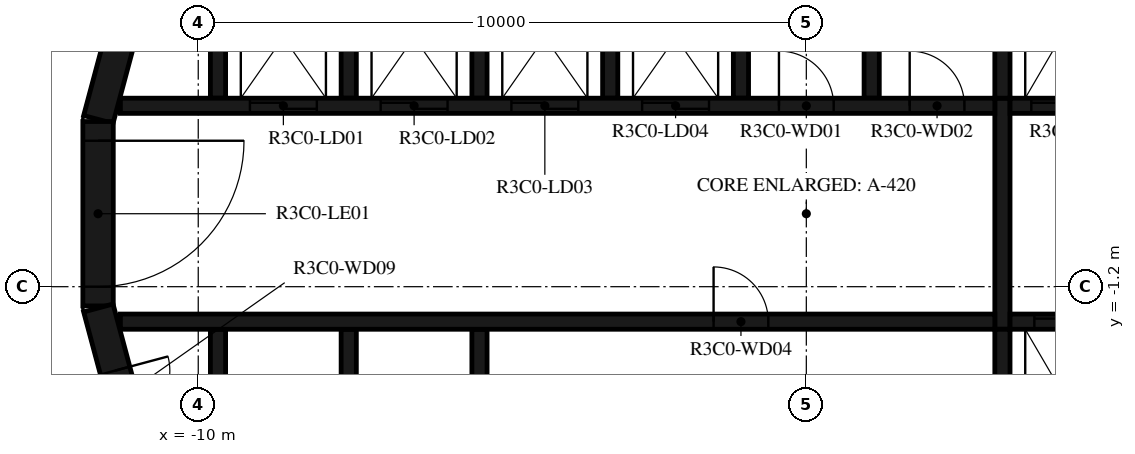
"""IFC4 building model, lengths in metres.
Left out: names, types, materials, properties, quantities, classifications, styles, units other than length and angle.
Written with IfcOpenShell. Run it as: python <this file> out.ifc"""

import sys

from ifc_helpers import new_model, si_unit, direction, frame, frame_2d, origin, place, context, subcontext, project, spatial, polyline, rectangle, outline, extrude, element, fill, save


model = new_model("IFC4")
c1 = context("Model", 3, precision=1e-05, world=origin(), true_north=direction((0.0, 1.0)))
c2 = subcontext(c1, "Body", "Model", "MODEL_VIEW")
j1 = project(units=[si_unit("LENGTHUNIT", "METRE"), si_unit("PLANEANGLEUNIT", "RADIAN")], contexts=[c1])
p1 = place(None, origin())
s1 = spatial("IfcSite", under=j1, at=p1, CompositionType="ELEMENT")
p2 = place(p1, origin())
s2 = spatial("IfcBuilding", under=s1, at=p2, CompositionType="ELEMENT")
p3 = place(p2, frame((0.0, 0.0, 134.4)))
s3 = spatial("IfcBuildingStorey", under=s2, at=p3, CompositionType="ELEMENT", Elevation=134.4)
p4 = place(p3, frame((-10.858, 4.479, 0.0), z_axis=(0.0, 0.0, 1.0), x_axis=(-0.258734743916, -0.965948410781, 0.0)))
e1 = element("IfcWall", 1, at=p4, inside=s3, PredefinedType="SHEAR", context=c2, shape_type="SweptSolid", body=[
    extrude(rectangle(XDim=3.033, YDim=0.5, at=frame_2d((1.516, 0.0))), origin(), (0.0, 0.0, 1.0), 3.12),
])
p5 = place(p3, frame((-11.647, 1.516, 0.0), z_axis=(0.0, 0.0, 1.0), x_axis=(0.0, -1.0, 0.0)))
e2 = element("IfcWall", 2, at=p5, inside=s3, PredefinedType="SHEAR", context=c2, shape_type="SweptSolid", body=[
    extrude(rectangle(XDim=3.033, YDim=0.5, at=frame_2d((1.516, 0.0))), origin(), (0.0, 0.0, 1.0), 3.12),
])
p6 = place(p5, frame((0.316, 0.0, 0.0)))
e3 = element("IfcOpeningElement", 3, at=p6, cuts=e2, PredefinedType="OPENING", context=c2, shape_type="SweptSolid", body=[
    extrude(rectangle(XDim=2.4, YDim=2.1, at=frame_2d((1.2, 1.05))), frame((0.0, 0.26, 0.0), z_axis=(0.0, -1.0, 0.0), x_axis=(1.0, 0.0, 0.0)), (0.0, 0.0, 1.0), 0.52),
])
p7 = place(p3, frame((-11.643, -1.55, 0.0), z_axis=(0.0, 0.0, 1.0), x_axis=(0.258734743916, -0.965948410781, 0.0)))
e4 = element("IfcWall", 4, at=p7, inside=s3, PredefinedType="SHEAR", context=c2, shape_type="SweptSolid", body=[
    extrude(rectangle(XDim=3.033, YDim=0.5, at=frame_2d((1.516, 0.0))), origin(), (0.0, 0.0, 1.0), 3.12),
])
p8 = place(p7, frame((1.066, 0.0, 0.0)))
e5 = element("IfcOpeningElement", 5, at=p8, cuts=e4, PredefinedType="OPENING", context=c2, shape_type="SweptSolid", body=[
    extrude(rectangle(XDim=0.9, YDim=2.1, at=frame_2d((0.45, 1.05))), frame((0.0, 0.26, 0.0), z_axis=(0.0, -1.0, 0.0), x_axis=(1.0, 0.0, 0.0)), (0.0, 0.0, 1.0), 0.52),
])
p9 = place(p3, origin())
e6 = element("IfcWall", 6, at=p9, inside=s3, PredefinedType="SHEAR", context=c2, shape_type="SweptSolid", body=[
    extrude(outline(polyline([(-9.55, 4.8), (-7.65, 4.8), (-7.65, 1.9), (-7.4, 1.9), (-7.4, 4.8), (-5.5, 4.8), (-5.5, 1.9), (-5.25, 1.9), (-5.25, 4.8), (-3.35, 4.8), (-3.35, 1.9), (-3.1, 1.9), (-3.1, 4.8), (-1.2, 4.8), (-1.2, 1.9), (-0.95, 1.9), (-0.95, 4.8), (0.95, 4.8), (0.95, 1.9), (1.2, 1.9), (1.2, 4.8), (3.1, 4.8), (3.1, 1.9), (3.35, 1.9), (3.35, 4.8), (5.25, 4.8), (5.25, 1.9), (5.5, 1.9), (5.5, 4.8), (7.4, 4.8), (7.4, 1.9), (7.65, 1.9), (7.65, 4.8), (9.55, 4.8), (9.55, 1.9), (9.8, 1.9), (9.8, 4.8), (9.8, 5.05), (-9.8, 5.05), (-9.8, 4.8), (-9.8, 1.9), (-9.55, 1.9), (-9.55, 4.8)])), origin(), (0.0, 0.0, 1.0), 3.12),
])
p10 = place(p3, origin())
e7 = element("IfcWall", 7, at=p10, inside=s3, PredefinedType="SHEAR", context=c2, shape_type="SweptSolid", body=[
    extrude(outline(polyline([(9.8, -5.05), (9.8, -4.8), (9.8, -1.9), (9.55, -1.9), (9.55, -4.8), (7.65, -4.8), (7.65, -1.9), (7.4, -1.9), (7.4, -4.8), (5.5, -4.8), (5.5, -1.9), (5.25, -1.9), (5.25, -4.8), (3.35, -4.8), (3.35, -1.9), (3.1, -1.9), (3.1, -4.8), (-5.25, -4.8), (-5.25, -1.9), (-5.5, -1.9), (-5.5, -4.8), (-7.4, -4.8), (-7.4, -1.9), (-7.65, -1.9), (-7.65, -4.8), (-9.55, -4.8), (-9.55, -1.9), (-9.8, -1.9), (-9.8, -4.8), (-9.8, -5.05), (9.8, -5.05)])), origin(), (0.0, 0.0, 1.0), 3.12),
])
p11 = place(p3, frame((-11.28, 1.775, 0.0), z_axis=(0.0, 0.0, 1.0), x_axis=(1.0, 0.0, 0.0)))
e8 = element("IfcWall", 8, at=p11, inside=s3, PredefinedType="SHEAR", context=c2, shape_type="SweptSolid", body=[
    extrude(rectangle(XDim=14.38, YDim=0.25, at=frame_2d((7.19, 0.0))), origin(), (0.0, 0.0, 1.0), 3.12),
])
p12 = place(p11, frame((2.13, 0.0, 0.0)))
e9 = element("IfcOpeningElement", 9, at=p12, cuts=e8, PredefinedType="OPENING", context=c2, shape_type="SweptSolid", body=[
    extrude(rectangle(XDim=1.1, YDim=2.1, at=frame_2d((0.55, 1.05))), frame((0.0, 0.135, 0.0), z_axis=(0.0, -1.0, 0.0), x_axis=(1.0, 0.0, 0.0)), (0.0, 0.0, 1.0), 0.27),
])
p13 = place(p11, frame((4.28, 0.0, 0.0)))
e10 = element("IfcOpeningElement", 10, at=p13, cuts=e8, PredefinedType="OPENING", context=c2, shape_type="SweptSolid", body=[
    extrude(rectangle(XDim=1.1, YDim=2.1, at=frame_2d((0.55, 1.05))), frame((0.0, 0.135, 0.0), z_axis=(0.0, -1.0, 0.0), x_axis=(1.0, 0.0, 0.0)), (0.0, 0.0, 1.0), 0.27),
])
p14 = place(p11, frame((6.43, 0.0, 0.0)))
e11 = element("IfcOpeningElement", 11, at=p14, cuts=e8, PredefinedType="OPENING", context=c2, shape_type="SweptSolid", body=[
    extrude(rectangle(XDim=1.1, YDim=2.1, at=frame_2d((0.55, 1.05))), frame((0.0, 0.135, 0.0), z_axis=(0.0, -1.0, 0.0), x_axis=(1.0, 0.0, 0.0)), (0.0, 0.0, 1.0), 0.27),
])
p15 = place(p11, frame((8.58, 0.0, 0.0)))
e12 = element("IfcOpeningElement", 12, at=p15, cuts=e8, PredefinedType="OPENING", context=c2, shape_type="SweptSolid", body=[
    extrude(rectangle(XDim=1.1, YDim=2.1, at=frame_2d((0.55, 1.05))), frame((0.0, 0.135, 0.0), z_axis=(0.0, -1.0, 0.0), x_axis=(1.0, 0.0, 0.0)), (0.0, 0.0, 1.0), 0.27),
])
p16 = place(p11, frame((10.83, 0.0, 0.0)))
e13 = element("IfcOpeningElement", 13, at=p16, cuts=e8, PredefinedType="OPENING", context=c2, shape_type="SweptSolid", body=[
    extrude(rectangle(XDim=0.9, YDim=2.1, at=frame_2d((0.45, 1.05))), frame((0.0, 0.135, 0.0), z_axis=(0.0, -1.0, 0.0), x_axis=(1.0, 0.0, 0.0)), (0.0, 0.0, 1.0), 0.27),
])
p17 = place(p11, frame((12.98, 0.0, 0.0)))
e14 = element("IfcOpeningElement", 14, at=p17, cuts=e8, PredefinedType="OPENING", context=c2, shape_type="SweptSolid", body=[
    extrude(rectangle(XDim=0.9, YDim=2.1, at=frame_2d((0.45, 1.05))), frame((0.0, 0.135, 0.0), z_axis=(0.0, -1.0, 0.0), x_axis=(1.0, 0.0, 0.0)), (0.0, 0.0, 1.0), 0.27),
])
p18 = place(p3, frame((3.35, 1.775, 0.0), z_axis=(0.0, 0.0, 1.0), x_axis=(1.0, 0.0, 0.0)))
e15 = element("IfcWall", 15, at=p18, inside=s3, PredefinedType="SHEAR", context=c2, shape_type="SweptSolid", body=[
    extrude(rectangle(XDim=7.93, YDim=0.25, at=frame_2d((3.965, 0.0))), origin(), (0.0, 0.0, 1.0), 3.12),
])
p19 = place(p18, frame((0.35, 0.0, 0.0)))
e16 = element("IfcOpeningElement", 16, at=p19, cuts=e15, PredefinedType="OPENING", context=c2, shape_type="SweptSolid", body=[
    extrude(rectangle(XDim=1.2, YDim=2.4, at=frame_2d((0.6, 1.2))), frame((0.0, 0.135, 0.0), z_axis=(0.0, -1.0, 0.0), x_axis=(1.0, 0.0, 0.0)), (0.0, 0.0, 1.0), 0.27),
])
p20 = place(p18, frame((2.5, 0.0, 0.0)))
e17 = element("IfcOpeningElement", 17, at=p20, cuts=e15, PredefinedType="OPENING", context=c2, shape_type="SweptSolid", body=[
    extrude(rectangle(XDim=1.2, YDim=2.4, at=frame_2d((0.6, 1.2))), frame((0.0, 0.135, 0.0), z_axis=(0.0, -1.0, 0.0), x_axis=(1.0, 0.0, 0.0)), (0.0, 0.0, 1.0), 0.27),
])
p21 = place(p18, frame((4.8, 0.0, 0.0)))
e18 = element("IfcOpeningElement", 18, at=p21, cuts=e15, PredefinedType="OPENING", context=c2, shape_type="SweptSolid", body=[
    extrude(rectangle(XDim=0.9, YDim=2.1, at=frame_2d((0.45, 1.05))), frame((0.0, 0.135, 0.0), z_axis=(0.0, -1.0, 0.0), x_axis=(1.0, 0.0, 0.0)), (0.0, 0.0, 1.0), 0.27),
])
p22 = place(p3, frame((-11.28, -1.775, 0.0), z_axis=(0.0, 0.0, 1.0), x_axis=(1.0, 0.0, 0.0)))
e19 = element("IfcWall", 19, at=p22, inside=s3, PredefinedType="SHEAR", context=c2, shape_type="SweptSolid", body=[
    extrude(rectangle(XDim=14.38, YDim=0.25, at=frame_2d((7.19, 0.0))), origin(), (0.0, 0.0, 1.0), 3.12),
])
p23 = place(p22, frame((9.755, 0.0, 0.0)))
e20 = element("IfcOpeningElement", 20, at=p23, cuts=e19, PredefinedType="OPENING", context=c2, shape_type="SweptSolid", body=[
    extrude(rectangle(XDim=0.9, YDim=2.1, at=frame_2d((0.45, 1.05))), frame((0.0, 0.135, 0.0), z_axis=(0.0, -1.0, 0.0), x_axis=(1.0, 0.0, 0.0)), (0.0, 0.0, 1.0), 0.27),
])
p24 = place(p3, frame((3.35, -1.775, 0.0), z_axis=(0.0, 0.0, 1.0), x_axis=(1.0, 0.0, 0.0)))
e21 = element("IfcWall", 21, at=p24, inside=s3, PredefinedType="SHEAR", context=c2, shape_type="SweptSolid", body=[
    extrude(rectangle(XDim=7.93, YDim=0.25, at=frame_2d((3.965, 0.0))), origin(), (0.0, 0.0, 1.0), 3.12),
])
p25 = place(p24, frame((0.4, 0.0, 0.0)))
e22 = element("IfcOpeningElement", 22, at=p25, cuts=e21, PredefinedType="OPENING", context=c2, shape_type="SweptSolid", body=[
    extrude(rectangle(XDim=1.1, YDim=2.4, at=frame_2d((0.55, 1.2))), frame((0.0, 0.135, 0.0), z_axis=(0.0, -1.0, 0.0), x_axis=(1.0, 0.0, 0.0)), (0.0, 0.0, 1.0), 0.27),
])
p26 = place(p24, frame((2.55, 0.0, 0.0)))
e23 = element("IfcOpeningElement", 23, at=p26, cuts=e21, PredefinedType="OPENING", context=c2, shape_type="SweptSolid", body=[
    extrude(rectangle(XDim=1.1, YDim=2.4, at=frame_2d((0.55, 1.2))), frame((0.0, 0.135, 0.0), z_axis=(0.0, -1.0, 0.0), x_axis=(1.0, 0.0, 0.0)), (0.0, 0.0, 1.0), 0.27),
])
p27 = place(p24, frame((4.7, 0.0, 0.0)))
e24 = element("IfcOpeningElement", 24, at=p27, cuts=e21, PredefinedType="OPENING", context=c2, shape_type="SweptSolid", body=[
    extrude(rectangle(XDim=1.1, YDim=2.4, at=frame_2d((0.55, 1.2))), frame((0.0, 0.135, 0.0), z_axis=(0.0, -1.0, 0.0), x_axis=(1.0, 0.0, 0.0)), (0.0, 0.0, 1.0), 0.27),
])
p28 = place(p3, frame((3.225, -1.9, 0.0), z_axis=(0.0, 0.0, 1.0), x_axis=(0.0, 1.0, 0.0)))
e25 = element("IfcWall", 25, at=p28, inside=s3, PredefinedType="SHEAR", context=c2, shape_type="SweptSolid", body=[
    extrude(rectangle(XDim=3.8, YDim=0.25, at=frame_2d((1.9, 0.0))), origin(), (0.0, 0.0, 1.0), 3.12),
])
p29 = place(p3, frame((-12.028, 7.516, 0.0), z_axis=(0.0, 0.0, 1.0), x_axis=(-0.292365533182, -0.956306642771, 0.0)))
e26 = element("IfcWall", 26, at=p29, inside=s3, PredefinedType="STANDARD", context=c2, shape_type="SweptSolid", body=[
    extrude(rectangle(XDim=7.342, YDim=0.2, at=frame_2d((3.671, 0.0))), origin(), (0.0, 0.0, 1.0), 3.12),
])
p30 = place(p29, frame((2.533, 0.0, 0.0)))
e27 = element("IfcOpeningElement", 27, at=p30, cuts=e26, PredefinedType="OPENING", context=c2, shape_type="SweptSolid", body=[
    extrude(rectangle(XDim=1.0, YDim=2.1, at=frame_2d((0.5, 1.05))), frame((0.0, 0.11, 0.0), z_axis=(0.0, -1.0, 0.0), x_axis=(1.0, 0.0, 0.0)), (0.0, 0.0, 1.0), 0.22),
])
p31 = place(p6, origin())
e28 = element("IfcDoor", 28, at=p31, inside=s3, OperationType="DOUBLE_DOOR_SINGLE_SWING", PredefinedType="DOOR", context=c2, shape_type="SweptSolid", body=[
    extrude(rectangle(XDim=2.4, YDim=2.1, at=frame_2d((1.2, 1.05))), frame((0.0, 0.025, 0.0), z_axis=(0.0, -1.0, 0.0), x_axis=(1.0, 0.0, 0.0)), (0.0, 0.0, 1.0), 0.05),
])
fill(e3, e28)
p32 = place(p12, origin())
e29 = element("IfcDoor", 29, at=p32, inside=s3, OperationType="DOUBLE_DOOR_SLIDING", PredefinedType="DOOR", context=c2, shape_type="SweptSolid", body=[
    extrude(rectangle(XDim=1.1, YDim=2.1, at=frame_2d((0.55, 1.05))), frame((0.0, 0.025, 0.0), z_axis=(0.0, -1.0, 0.0), x_axis=(1.0, 0.0, 0.0)), (0.0, 0.0, 1.0), 0.05),
])
fill(e9, e29)
p33 = place(p13, origin())
e30 = element("IfcDoor", 30, at=p33, inside=s3, OperationType="DOUBLE_DOOR_SLIDING", PredefinedType="DOOR", context=c2, shape_type="SweptSolid", body=[
    extrude(rectangle(XDim=1.1, YDim=2.1, at=frame_2d((0.55, 1.05))), frame((0.0, 0.025, 0.0), z_axis=(0.0, -1.0, 0.0), x_axis=(1.0, 0.0, 0.0)), (0.0, 0.0, 1.0), 0.05),
])
fill(e10, e30)
p34 = place(p14, origin())
e31 = element("IfcDoor", 31, at=p34, inside=s3, OperationType="DOUBLE_DOOR_SLIDING", PredefinedType="DOOR", context=c2, shape_type="SweptSolid", body=[
    extrude(rectangle(XDim=1.1, YDim=2.1, at=frame_2d((0.55, 1.05))), frame((0.0, 0.025, 0.0), z_axis=(0.0, -1.0, 0.0), x_axis=(1.0, 0.0, 0.0)), (0.0, 0.0, 1.0), 0.05),
])
fill(e11, e31)
p35 = place(p15, origin())
e32 = element("IfcDoor", 32, at=p35, inside=s3, OperationType="DOUBLE_DOOR_SLIDING", PredefinedType="DOOR", context=c2, shape_type="SweptSolid", body=[
    extrude(rectangle(XDim=1.1, YDim=2.1, at=frame_2d((0.55, 1.05))), frame((0.0, 0.025, 0.0), z_axis=(0.0, -1.0, 0.0), x_axis=(1.0, 0.0, 0.0)), (0.0, 0.0, 1.0), 0.05),
])
fill(e12, e32)
p36 = place(p19, origin())
e33 = element("IfcDoor", 33, at=p36, inside=s3, OperationType="DOUBLE_DOOR_SLIDING", PredefinedType="DOOR", context=c2, shape_type="SweptSolid", body=[
    extrude(rectangle(XDim=1.2, YDim=2.4, at=frame_2d((0.6, 1.2))), frame((0.0, 0.025, 0.0), z_axis=(0.0, -1.0, 0.0), x_axis=(1.0, 0.0, 0.0)), (0.0, 0.0, 1.0), 0.05),
])
fill(e16, e33)
p37 = place(p25, origin())
e34 = element("IfcDoor", 34, at=p37, inside=s3, OperationType="DOUBLE_DOOR_SLIDING", PredefinedType="DOOR", context=c2, shape_type="SweptSolid", body=[
    extrude(rectangle(XDim=1.1, YDim=2.4, at=frame_2d((0.55, 1.2))), frame((0.0, 0.025, 0.0), z_axis=(0.0, -1.0, 0.0), x_axis=(1.0, 0.0, 0.0)), (0.0, 0.0, 1.0), 0.05),
])
fill(e22, e34)
p38 = place(p16, origin())
e35 = element("IfcDoor", 35, at=p38, inside=s3, OperationType="SINGLE_SWING_RIGHT", PredefinedType="DOOR", context=c2, shape_type="SweptSolid", body=[
    extrude(rectangle(XDim=0.9, YDim=2.1, at=frame_2d((0.45, 1.05))), frame((0.0, 0.025, 0.0), z_axis=(0.0, -1.0, 0.0), x_axis=(1.0, 0.0, 0.0)), (0.0, 0.0, 1.0), 0.05),
])
fill(e13, e35)
p39 = place(p17, origin())
e36 = element("IfcDoor", 36, at=p39, inside=s3, OperationType="SINGLE_SWING_LEFT", PredefinedType="DOOR", context=c2, shape_type="SweptSolid", body=[
    extrude(rectangle(XDim=0.9, YDim=2.1, at=frame_2d((0.45, 1.05))), frame((0.0, 0.025, 0.0), z_axis=(0.0, -1.0, 0.0), x_axis=(1.0, 0.0, 0.0)), (0.0, 0.0, 1.0), 0.05),
])
fill(e14, e36)
p40 = place(p23, origin())
e37 = element("IfcDoor", 37, at=p40, inside=s3, OperationType="SINGLE_SWING_LEFT", PredefinedType="DOOR", context=c2, shape_type="SweptSolid", body=[
    extrude(rectangle(XDim=0.9, YDim=2.1, at=frame_2d((0.45, 1.05))), frame((0.0, 0.025, 0.0), z_axis=(0.0, -1.0, 0.0), x_axis=(1.0, 0.0, 0.0)), (0.0, 0.0, 1.0), 0.05),
])
fill(e20, e37)
p41 = place(p8, origin())
e38 = element("IfcDoor", 38, at=p41, inside=s3, OperationType="SINGLE_SWING_RIGHT", PredefinedType="DOOR", context=c2, shape_type="SweptSolid", body=[
    extrude(rectangle(XDim=0.9, YDim=2.1, at=frame_2d((0.45, 1.05))), frame((0.0, 0.025, 0.0), z_axis=(0.0, -1.0, 0.0), x_axis=(1.0, 0.0, 0.0)), (0.0, 0.0, 1.0), 0.05),
])
fill(e5, e38)
save(model, sys.argv[1])
